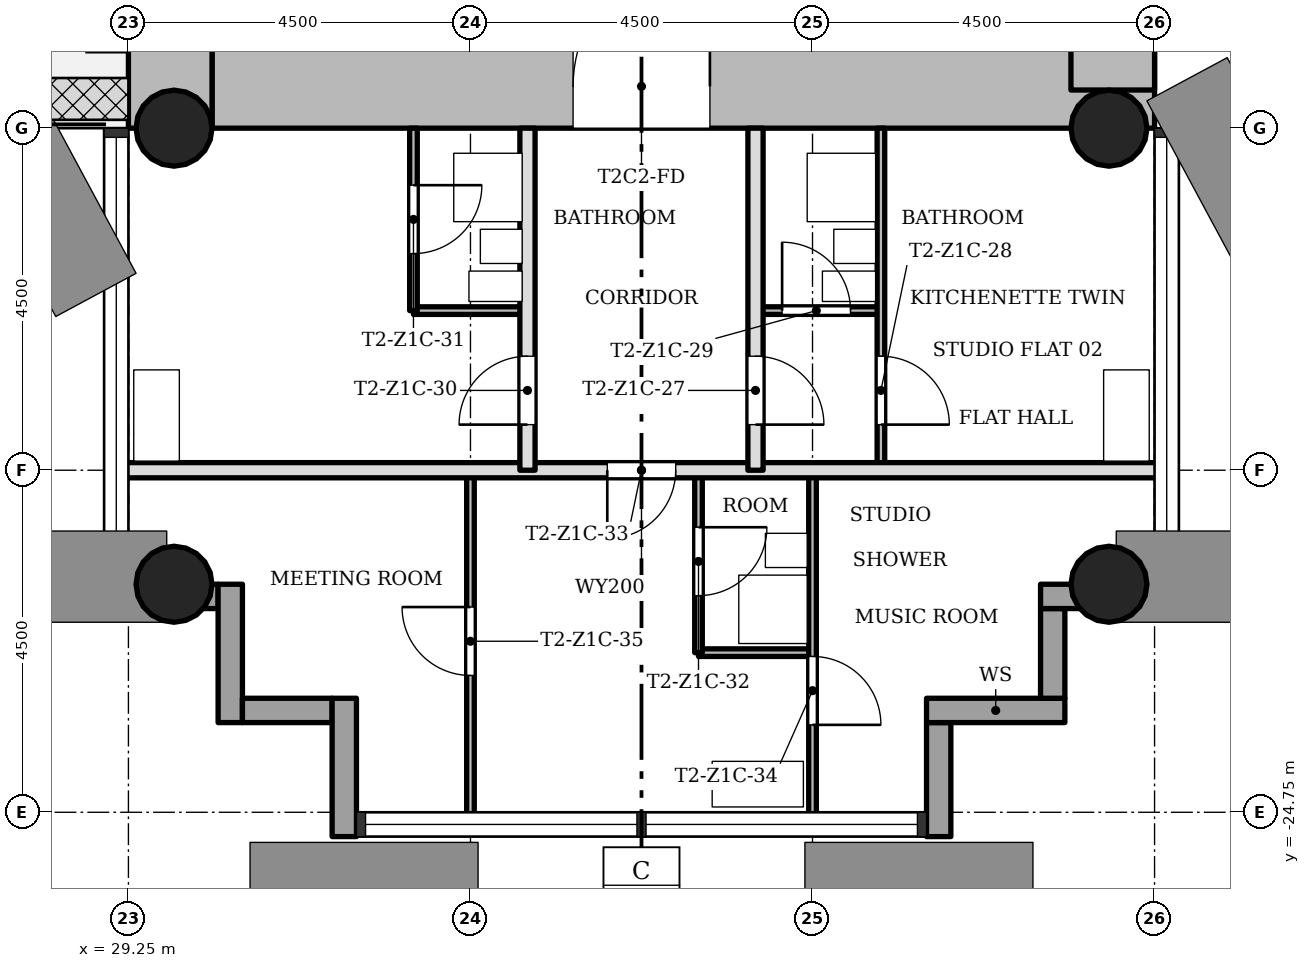
"""IFC4 building model, lengths in metres.
Left out: names, types, materials, properties, quantities, classifications, styles, units other than length and angle.
Written with IfcOpenShell. Run it as: python <this file> out.ifc"""

import sys

from ifc_helpers import new_model, si_unit, direction, frame, frame_2d, origin, origin_2d, place, context, subcontext, project, spatial, rectangle, hollow_circle, extrude, element, fill, save


model = new_model("IFC4")
c1 = context("Model", 3, precision=1e-05, world=origin(), true_north=direction((0.0, 1.0)))
c2 = subcontext(c1, "Body", "Model", "MODEL_VIEW")
j1 = project(units=[si_unit("LENGTHUNIT", "METRE"), si_unit("PLANEANGLEUNIT", "RADIAN")], contexts=[c1])
p1 = place(None, origin())
s1 = spatial("IfcSite", under=j1, at=p1, CompositionType="ELEMENT")
p2 = place(p1, origin())
s2 = spatial("IfcBuilding", under=s1, at=p2, CompositionType="ELEMENT")
p3 = place(p2, frame((0.0, 0.0, 51.7)))
s3 = spatial("IfcBuildingStorey", under=s2, at=p3, CompositionType="ELEMENT", Elevation=51.7)
p4 = place(p3, frame((30.35, -15.2, 0.0), z_axis=(0.0, 0.0, 1.0), x_axis=(1.0, 0.0, 0.0)))
e1 = element("IfcWall", 1, at=p4, inside=s3, PredefinedType="SHEAR", context=c2, shape_type="SweptSolid", body=[
    extrude(rectangle(XDim=12.4, YDim=1.1, at=frame_2d((6.2, 0.0))), origin(), (0.0, 0.0, 1.0), 3.4),
])
p5 = place(p4, frame((4.75, 0.0, 0.0)))
e2 = element("IfcOpeningElement", 2, at=p5, cuts=e1, PredefinedType="OPENING", context=c2, shape_type="SweptSolid", body=[
    extrude(rectangle(XDim=1.8, YDim=2.1, at=frame_2d((0.9, 1.05))), frame((0.0, 0.56, 0.0), z_axis=(0.0, -1.0, 0.0), x_axis=(1.0, 0.0, 0.0)), (0.0, 0.0, 1.0), 1.12),
])
p6 = place(p3, frame((42.2, -15.248, 0.0), z_axis=(0.0, 0.0, 1.0), x_axis=(0.0, 1.0, 0.0)))
e3 = element("IfcWall", 3, at=p6, inside=s3, PredefinedType="SHEAR", context=c2, shape_type="SweptSolid", body=[
    extrude(rectangle(XDim=8.596, YDim=1.1, at=frame_2d((4.298, 0.0))), origin(), (0.0, 0.0, 1.0), 3.4),
])
p7 = place(p3, frame((29.8, -7.85, 0.0), z_axis=(0.0, 0.0, 1.0), x_axis=(0.0, -1.0, 0.0)))
e4 = element("IfcWall", 4, at=p7, inside=s3, PredefinedType="SHEAR", context=c2, shape_type="SweptSolid", body=[
    extrude(rectangle(XDim=7.9, YDim=1.1, at=frame_2d((3.95, 0.0))), origin(), (0.0, 0.0, 1.0), 3.4),
])
for number, where, z_axis, x_axis in (
    (5, (42.15, -15.75, 0.0), (0.0, 0.0, 1.0), (1.0, 0.0, 0.0)),
    (6, (29.85, -15.75, 0.0), (0.0, 0.0, 1.0), (1.0, 0.0, 0.0)),
    (7, (42.15, -21.75, 0.0), (0.0, 0.0, 1.0), (1.0, 0.0, 0.0)),
    (8, (29.85, -21.75, 0.0), (0.0, 0.0, 1.0), (1.0, 0.0, 0.0)),
):
    element("IfcColumn", number, at=place(p3, frame(where, z_axis=z_axis, x_axis=x_axis)), inside=s3, PredefinedType="COLUMN", context=c2, shape_type="SweptSolid", body=[
        extrude(hollow_circle(Radius=0.5, WallThickness=0.036, at=origin_2d()), origin(), (0.0, 0.0, 1.0), 3.4),
    ])
p8 = place(p3, frame((39.91, -25.07, -0.3), z_axis=(0.0, 0.0, 1.0), x_axis=(0.0, 1.0, 0.0)))
e9 = element("IfcWall", 9, at=p8, inside=s3, PredefinedType="STANDARD", context=c2, shape_type="SweptSolid", body=[
    extrude(rectangle(XDim=1.5, YDim=0.32, at=frame_2d((0.75, 0.0))), origin(), (0.0, 0.0, 1.0), 3.4),
])
p9 = place(p3, frame((39.75, -23.41, -0.3), z_axis=(0.0, 0.0, 1.0), x_axis=(1.0, 0.0, 0.0)))
e10 = element("IfcWall", 10, at=p9, inside=s3, PredefinedType="STANDARD", context=c2, shape_type="SweptSolid", body=[
    extrude(rectangle(XDim=1.82, YDim=0.32, at=frame_2d((0.91, 0.0))), origin(), (0.0, 0.0, 1.0), 3.4),
])
p10 = place(p3, frame((41.41, -23.25, -0.3), z_axis=(0.0, 0.0, 1.0), x_axis=(0.0, 1.0, 0.0)))
e11 = element("IfcWall", 11, at=p10, inside=s3, PredefinedType="STANDARD", context=c2, shape_type="SweptSolid", body=[
    extrude(rectangle(XDim=1.18, YDim=0.32, at=frame_2d((0.59, 0.0))), origin(), (0.0, 0.0, 1.0), 3.4),
])
p11 = place(p3, frame((41.25, -21.91, -0.3), z_axis=(0.0, 0.0, 1.0), x_axis=(1.0, 0.0, 0.0)))
e12 = element("IfcWall", 12, at=p11, inside=s3, PredefinedType="STANDARD", context=c2, shape_type="SweptSolid", body=[
    extrude(rectangle(XDim=1.82, YDim=0.32, at=frame_2d((0.91, 0.0))), origin(), (0.0, 0.0, 1.0), 3.4),
])
p12 = place(p3, frame((28.93, -21.91, -0.3), z_axis=(0.0, 0.0, 1.0), x_axis=(1.0, 0.0, 0.0)))
e13 = element("IfcWall", 13, at=p12, inside=s3, PredefinedType="STANDARD", context=c2, shape_type="SweptSolid", body=[
    extrude(rectangle(XDim=1.5, YDim=0.32, at=frame_2d((0.75, 0.0))), origin(), (0.0, 0.0, 1.0), 3.4),
])
p13 = place(p3, frame((30.59, -21.75, -0.3), z_axis=(0.0, 0.0, 1.0), x_axis=(0.0, -1.0, 0.0)))
e14 = element("IfcWall", 14, at=p13, inside=s3, PredefinedType="STANDARD", context=c2, shape_type="SweptSolid", body=[
    extrude(rectangle(XDim=1.82, YDim=0.32, at=frame_2d((0.91, 0.0))), origin(), (0.0, 0.0, 1.0), 3.4),
])
p14 = place(p3, frame((30.75, -23.41, -0.3), z_axis=(0.0, 0.0, 1.0), x_axis=(1.0, 0.0, 0.0)))
e15 = element("IfcWall", 15, at=p14, inside=s3, PredefinedType="STANDARD", context=c2, shape_type="SweptSolid", body=[
    extrude(rectangle(XDim=1.18, YDim=0.32, at=frame_2d((0.59, 0.0))), origin(), (0.0, 0.0, 1.0), 3.4),
])
p15 = place(p3, frame((32.09, -23.25, -0.3), z_axis=(0.0, 0.0, 1.0), x_axis=(0.0, -1.0, 0.0)))
e16 = element("IfcWall", 16, at=p15, inside=s3, PredefinedType="STANDARD", context=c2, shape_type="SweptSolid", body=[
    extrude(rectangle(XDim=1.82, YDim=0.32, at=frame_2d((0.91, 0.0))), origin(), (0.0, 0.0, 1.0), 3.4),
])
p16 = place(p3, frame((38.25, -22.65, 0.0), z_axis=(0.0, 0.0, 1.0), x_axis=(-1.0, 0.0, 0.0)))
e17 = element("IfcWall", 17, at=p16, inside=s3, PredefinedType="PARTITIONING", context=c2, shape_type="SweptSolid", body=[
    extrude(rectangle(XDim=1.5, YDim=0.1, at=frame_2d((0.75, 0.0))), origin(), (0.0, 0.0, 1.0), 3.0),
])
p17 = place(p3, frame((42.85, -20.25, 0.0), z_axis=(0.0, 0.0, 1.0), x_axis=(-1.0, 0.0, 0.0)))
e18 = element("IfcWall", 18, at=p17, inside=s3, PredefinedType="SOLIDWALL", context=c2, shape_type="SweptSolid", body=[
    extrude(rectangle(XDim=13.7, YDim=0.2, at=frame_2d((6.85, 0.0))), origin(), (0.0, 0.0, 1.0), 3.0),
])
p18 = place(p17, frame((6.4, 0.0, 0.0)))
e19 = element("IfcOpeningElement", 19, at=p18, cuts=e18, PredefinedType="OPENING", context=c2, shape_type="SweptSolid", body=[
    extrude(rectangle(XDim=0.9, YDim=2.1, at=frame_2d((0.45, 1.05))), frame((0.0, 0.11, 0.0), z_axis=(0.0, -1.0, 0.0), x_axis=(1.0, 0.0, 0.0)), (0.0, 0.0, 1.0), 0.22),
])
p19 = place(p3, frame((39.15, -18.15, 0.0), z_axis=(0.0, 0.0, 1.0), x_axis=(-1.0, 0.0, 0.0)))
e20 = element("IfcWall", 20, at=p19, inside=s3, PredefinedType="PARTITIONING", context=c2, shape_type="SweptSolid", body=[
    extrude(rectangle(XDim=1.65, YDim=0.1, at=frame_2d((0.825, 0.0))), origin(), (0.0, 0.0, 1.0), 3.0),
])
p20 = place(p19, frame((0.4, 0.0, 0.0)))
e21 = element("IfcOpeningElement", 21, at=p20, cuts=e20, PredefinedType="OPENING", context=c2, shape_type="SweptSolid", body=[
    extrude(rectangle(XDim=0.9, YDim=2.1, at=frame_2d((0.45, 1.05))), frame((0.0, 0.06, 0.0), z_axis=(0.0, -1.0, 0.0), x_axis=(1.0, 0.0, 0.0)), (0.0, 0.0, 1.0), 0.12),
])
p21 = place(p3, frame((34.5, -18.15, 0.0), z_axis=(0.0, 0.0, 1.0), x_axis=(-1.0, 0.0, 0.0)))
e22 = element("IfcWall", 22, at=p21, inside=s3, PredefinedType="PARTITIONING", context=c2, shape_type="SweptSolid", body=[
    extrude(rectangle(XDim=1.5, YDim=0.1, at=frame_2d((0.75, 0.0))), origin(), (0.0, 0.0, 1.0), 3.0),
])
p22 = place(p3, frame((39.15, -20.25, 0.0), z_axis=(0.0, 0.0, 1.0), x_axis=(0.0, 1.0, 0.0)))
e23 = element("IfcWall", 23, at=p22, inside=s3, PredefinedType="PARTITIONING", context=c2, shape_type="SweptSolid", body=[
    extrude(rectangle(XDim=4.5, YDim=0.1, at=frame_2d((2.25, 0.0))), origin(), (0.0, 0.0, 1.0), 3.0),
])
p23 = place(p22, frame((0.6, 0.0, 0.0)))
e24 = element("IfcOpeningElement", 24, at=p23, cuts=e23, PredefinedType="OPENING", context=c2, shape_type="SweptSolid", body=[
    extrude(rectangle(XDim=0.9, YDim=2.1, at=frame_2d((0.45, 1.05))), frame((0.0, 0.06, 0.0), z_axis=(0.0, -1.0, 0.0), x_axis=(1.0, 0.0, 0.0)), (0.0, 0.0, 1.0), 0.12),
])
p24 = place(p3, frame((38.25, -24.85, 0.0), z_axis=(0.0, 0.0, 1.0), x_axis=(0.0, 1.0, 0.0)))
e25 = element("IfcWall", 25, at=p24, inside=s3, PredefinedType="PARTITIONING", context=c2, shape_type="SweptSolid", body=[
    extrude(rectangle(XDim=4.6, YDim=0.1, at=frame_2d((2.3, 0.0))), origin(), (0.0, 0.0, 1.0), 3.0),
])
p25 = place(p24, frame((1.25, 0.0, 0.0)))
e26 = element("IfcOpeningElement", 26, at=p25, cuts=e25, PredefinedType="OPENING", context=c2, shape_type="SweptSolid", body=[
    extrude(rectangle(XDim=0.9, YDim=2.1, at=frame_2d((0.45, 1.05))), frame((0.0, 0.06, 0.0), z_axis=(0.0, -1.0, 0.0), x_axis=(1.0, 0.0, 0.0)), (0.0, 0.0, 1.0), 0.12),
])
p26 = place(p3, frame((37.5, -20.25, 0.0), z_axis=(0.0, 0.0, 1.0), x_axis=(0.0, 1.0, 0.0)))
e27 = element("IfcWall", 27, at=p26, inside=s3, PredefinedType="SOLIDWALL", context=c2, shape_type="SweptSolid", body=[
    extrude(rectangle(XDim=4.5, YDim=0.2, at=frame_2d((2.25, 0.0))), origin(), (0.0, 0.0, 1.0), 3.0),
])
p27 = place(p26, frame((0.6, 0.0, 0.0)))
e28 = element("IfcOpeningElement", 28, at=p27, cuts=e27, PredefinedType="OPENING", context=c2, shape_type="SweptSolid", body=[
    extrude(rectangle(XDim=0.9, YDim=2.1, at=frame_2d((0.45, 1.05))), frame((0.0, 0.11, 0.0), z_axis=(0.0, -1.0, 0.0), x_axis=(1.0, 0.0, 0.0)), (0.0, 0.0, 1.0), 0.22),
])
p28 = place(p3, frame((36.75, -22.65, 0.0), z_axis=(0.0, 0.0, 1.0), x_axis=(0.0, 1.0, 0.0)))
e29 = element("IfcWall", 29, at=p28, inside=s3, PredefinedType="PARTITIONING", context=c2, shape_type="SweptSolid", body=[
    extrude(rectangle(XDim=2.4, YDim=0.1, at=frame_2d((1.2, 0.0))), origin(), (0.0, 0.0, 1.0), 3.0),
])
p29 = place(p28, frame((0.75, 0.0, 0.0)))
e30 = element("IfcOpeningElement", 30, at=p29, cuts=e29, PredefinedType="OPENING", context=c2, shape_type="SweptSolid", body=[
    extrude(rectangle(XDim=0.9, YDim=2.1, at=frame_2d((0.45, 1.05))), frame((0.0, 0.06, 0.0), z_axis=(0.0, -1.0, 0.0), x_axis=(1.0, 0.0, 0.0)), (0.0, 0.0, 1.0), 0.12),
])
p30 = place(p3, frame((34.5, -20.25, 0.0), z_axis=(0.0, 0.0, 1.0), x_axis=(0.0, 1.0, 0.0)))
e31 = element("IfcWall", 31, at=p30, inside=s3, PredefinedType="SOLIDWALL", context=c2, shape_type="SweptSolid", body=[
    extrude(rectangle(XDim=4.5, YDim=0.2, at=frame_2d((2.25, 0.0))), origin(), (0.0, 0.0, 1.0), 3.0),
])
p31 = place(p30, frame((0.6, 0.0, 0.0)))
e32 = element("IfcOpeningElement", 32, at=p31, cuts=e31, PredefinedType="OPENING", context=c2, shape_type="SweptSolid", body=[
    extrude(rectangle(XDim=0.9, YDim=2.1, at=frame_2d((0.45, 1.05))), frame((0.0, 0.11, 0.0), z_axis=(0.0, -1.0, 0.0), x_axis=(1.0, 0.0, 0.0)), (0.0, 0.0, 1.0), 0.22),
])
p32 = place(p3, frame((33.75, -24.85, 0.0), z_axis=(0.0, 0.0, 1.0), x_axis=(0.0, 1.0, 0.0)))
e33 = element("IfcWall", 33, at=p32, inside=s3, PredefinedType="PARTITIONING", context=c2, shape_type="SweptSolid", body=[
    extrude(rectangle(XDim=4.6, YDim=0.1, at=frame_2d((2.3, 0.0))), origin(), (0.0, 0.0, 1.0), 3.0),
])
p33 = place(p32, frame((1.9, 0.0, 0.0)))
e34 = element("IfcOpeningElement", 34, at=p33, cuts=e33, PredefinedType="OPENING", context=c2, shape_type="SweptSolid", body=[
    extrude(rectangle(XDim=0.9, YDim=2.1, at=frame_2d((0.45, 1.05))), frame((0.0, 0.06, 0.0), z_axis=(0.0, -1.0, 0.0), x_axis=(1.0, 0.0, 0.0)), (0.0, 0.0, 1.0), 0.12),
])
p34 = place(p3, frame((33.0, -18.15, 0.0), z_axis=(0.0, 0.0, 1.0), x_axis=(0.0, 1.0, 0.0)))
e35 = element("IfcWall", 35, at=p34, inside=s3, PredefinedType="PARTITIONING", context=c2, shape_type="SweptSolid", body=[
    extrude(rectangle(XDim=2.4, YDim=0.1, at=frame_2d((1.2, 0.0))), origin(), (0.0, 0.0, 1.0), 3.0),
])
p35 = place(p34, frame((0.75, 0.0, 0.0)))
e36 = element("IfcOpeningElement", 36, at=p35, cuts=e35, PredefinedType="OPENING", context=c2, shape_type="SweptSolid", body=[
    extrude(rectangle(XDim=0.9, YDim=2.1, at=frame_2d((0.45, 1.05))), frame((0.0, 0.06, 0.0), z_axis=(0.0, -1.0, 0.0), x_axis=(1.0, 0.0, 0.0)), (0.0, 0.0, 1.0), 0.12),
])
p36 = place(p27, origin())
e37 = element("IfcDoor", 37, at=p36, inside=s3, OperationType="SINGLE_SWING_LEFT", PredefinedType="DOOR", context=c2, shape_type="SweptSolid", body=[
    extrude(rectangle(XDim=0.9, YDim=2.1, at=frame_2d((0.45, 1.05))), frame((0.0, 0.025, 0.0), z_axis=(0.0, -1.0, 0.0), x_axis=(1.0, 0.0, 0.0)), (0.0, 0.0, 1.0), 0.05),
])
fill(e28, e37)
p37 = place(p23, origin())
e38 = element("IfcDoor", 38, at=p37, inside=s3, OperationType="SINGLE_SWING_LEFT", PredefinedType="DOOR", context=c2, shape_type="SweptSolid", body=[
    extrude(rectangle(XDim=0.9, YDim=2.1, at=frame_2d((0.45, 1.05))), frame((0.0, 0.025, 0.0), z_axis=(0.0, -1.0, 0.0), x_axis=(1.0, 0.0, 0.0)), (0.0, 0.0, 1.0), 0.05),
])
fill(e24, e38)
p38 = place(p20, origin())
e39 = element("IfcDoor", 39, at=p38, inside=s3, OperationType="SINGLE_SWING_RIGHT", PredefinedType="DOOR", context=c2, shape_type="SweptSolid", body=[
    extrude(rectangle(XDim=0.9, YDim=2.1, at=frame_2d((0.45, 1.05))), frame((0.0, 0.025, 0.0), z_axis=(0.0, -1.0, 0.0), x_axis=(1.0, 0.0, 0.0)), (0.0, 0.0, 1.0), 0.05),
])
fill(e21, e39)
p39 = place(p31, origin())
e40 = element("IfcDoor", 40, at=p39, inside=s3, OperationType="SINGLE_SWING_RIGHT", PredefinedType="DOOR", context=c2, shape_type="SweptSolid", body=[
    extrude(rectangle(XDim=0.9, YDim=2.1, at=frame_2d((0.45, 1.05))), frame((0.0, 0.025, 0.0), z_axis=(0.0, -1.0, 0.0), x_axis=(1.0, 0.0, 0.0)), (0.0, 0.0, 1.0), 0.05),
])
fill(e32, e40)
p40 = place(p35, origin())
e41 = element("IfcDoor", 41, at=p40, inside=s3, OperationType="SINGLE_SWING_RIGHT", PredefinedType="DOOR", context=c2, shape_type="SweptSolid", body=[
    extrude(rectangle(XDim=0.9, YDim=2.1, at=frame_2d((0.45, 1.05))), frame((0.0, 0.025, 0.0), z_axis=(0.0, -1.0, 0.0), x_axis=(1.0, 0.0, 0.0)), (0.0, 0.0, 1.0), 0.05),
])
fill(e36, e41)
p41 = place(p29, origin())
e42 = element("IfcDoor", 42, at=p41, inside=s3, OperationType="SINGLE_SWING_RIGHT", PredefinedType="DOOR", context=c2, shape_type="SweptSolid", body=[
    extrude(rectangle(XDim=0.9, YDim=2.1, at=frame_2d((0.45, 1.05))), frame((0.0, 0.025, 0.0), z_axis=(0.0, -1.0, 0.0), x_axis=(1.0, 0.0, 0.0)), (0.0, 0.0, 1.0), 0.05),
])
fill(e30, e42)
p42 = place(p18, origin())
e43 = element("IfcDoor", 43, at=p42, inside=s3, OperationType="SINGLE_SWING_LEFT", PredefinedType="DOOR", context=c2, shape_type="SweptSolid", body=[
    extrude(rectangle(XDim=0.9, YDim=2.1, at=frame_2d((0.45, 1.05))), frame((0.0, 0.025, 0.0), z_axis=(0.0, -1.0, 0.0), x_axis=(1.0, 0.0, 0.0)), (0.0, 0.0, 1.0), 0.05),
])
fill(e19, e43)
p43 = place(p25, origin())
e44 = element("IfcDoor", 44, at=p43, inside=s3, OperationType="SINGLE_SWING_LEFT", PredefinedType="DOOR", context=c2, shape_type="SweptSolid", body=[
    extrude(rectangle(XDim=0.9, YDim=2.1, at=frame_2d((0.45, 1.05))), frame((0.0, 0.025, 0.0), z_axis=(0.0, -1.0, 0.0), x_axis=(1.0, 0.0, 0.0)), (0.0, 0.0, 1.0), 0.05),
])
fill(e26, e44)
p44 = place(p33, origin())
e45 = element("IfcDoor", 45, at=p44, inside=s3, OperationType="SINGLE_SWING_LEFT", PredefinedType="DOOR", context=c2, shape_type="SweptSolid", body=[
    extrude(rectangle(XDim=0.9, YDim=2.1, at=frame_2d((0.45, 1.05))), frame((0.0, 0.025, 0.0), z_axis=(0.0, -1.0, 0.0), x_axis=(1.0, 0.0, 0.0)), (0.0, 0.0, 1.0), 0.05),
])
fill(e34, e45)
p45 = place(p5, origin())
e46 = element("IfcDoor", 46, at=p45, inside=s3, OperationType="SINGLE_SWING_LEFT", PredefinedType="DOOR", context=c2, shape_type="SweptSolid", body=[
    extrude(rectangle(XDim=1.8, YDim=2.1, at=frame_2d((0.9, 1.05))), frame((0.0, 0.025, 0.0), z_axis=(0.0, -1.0, 0.0), x_axis=(1.0, 0.0, 0.0)), (0.0, 0.0, 1.0), 0.05),
])
fill(e2, e46)
save(model, sys.argv[1])
